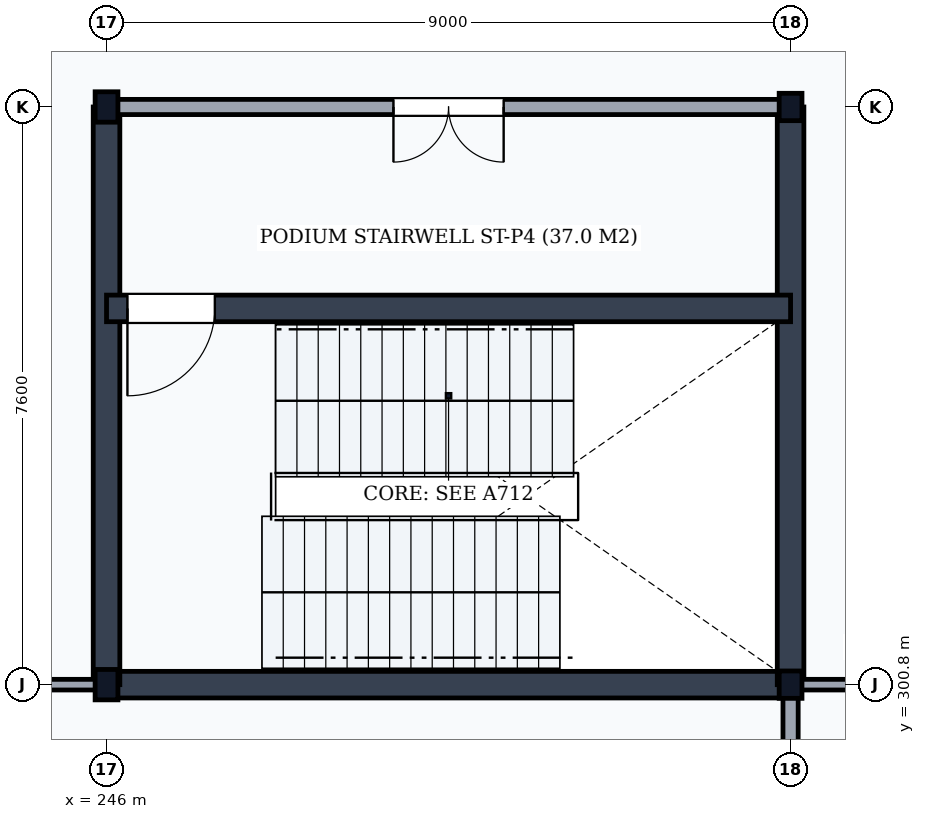
"""IFC4 building model, lengths in metres.
Left out: names, types, materials, properties, quantities, classifications, styles, units other than length and angle.
Written with IfcOpenShell. Run it as: python <this file> out.ifc"""

import sys

from ifc_helpers import new_model, si_unit, direction, frame, frame_2d, origin, origin_2d, place, context, subcontext, project, spatial, rectangle, i_section, extrude, element, fill, save


model = new_model("IFC4")
c1 = context("Model", 3, precision=1e-05, world=origin(), true_north=direction((0.0, 1.0)))
c2 = subcontext(c1, "Body", "Model", "MODEL_VIEW")
j1 = project(units=[si_unit("LENGTHUNIT", "METRE"), si_unit("PLANEANGLEUNIT", "RADIAN")], contexts=[c1])
p1 = place(None, origin())
s1 = spatial("IfcSite", under=j1, at=p1, CompositionType="ELEMENT")
p2 = place(p1, origin())
s2 = spatial("IfcBuilding", under=s1, at=p2, CompositionType="ELEMENT")
p3 = place(p2, frame((0.0, 0.0, 10.5)))
s3 = spatial("IfcBuildingStorey", under=s2, at=p3, CompositionType="ELEMENT", Elevation=10.5)
for number, where, z_axis, x_axis in (
    (1, (246.0, 300.8, 0.0), (0.0, 0.0, 1.0), (1.0, 0.0, 0.0)),
    (2, (246.0, 308.4, 0.0), (0.0, 0.0, 1.0), (1.0, 0.0, 0.0)),
):
    element("IfcColumn", number, at=place(p3, frame(where, z_axis=z_axis, x_axis=x_axis)), inside=s3, PredefinedType="COLUMN", context=c2, shape_type="SweptSolid", body=[
        extrude(i_section(OverallWidth=0.3, OverallDepth=0.4, WebThickness=0.013, FlangeThickness=0.024, FilletRadius=0.027, at=origin_2d()), origin(), (0.0, 0.0, 1.0), 5.1),
    ])
for number, where, z_axis, x_axis in (
    (3, (255.0, 300.8, 0.0), (0.0, 0.0, 1.0), (1.0, 0.0, 0.0)),
    (4, (255.0, 308.4, 0.0), (0.0, 0.0, 1.0), (1.0, 0.0, 0.0)),
):
    element("IfcColumn", number, at=place(p3, frame(where, z_axis=z_axis, x_axis=x_axis)), inside=s3, PredefinedType="COLUMN", context=c2, shape_type="SweptSolid", body=[
        extrude(i_section(OverallWidth=0.3, OverallDepth=0.36, WebThickness=0.012, FlangeThickness=0.022, FilletRadius=0.027, at=origin_2d()), origin(), (0.0, 0.0, 1.0), 5.1),
    ])
p4 = place(p3, frame((246.0, 300.8, 0.0), z_axis=(0.0, 0.0, 1.0), x_axis=(1.0, 0.0, 0.0)))
e5 = element("IfcWall", 5, at=p4, inside=s3, PredefinedType="SHEAR", context=c2, shape_type="SweptSolid", body=[
    extrude(rectangle(XDim=9.0, YDim=0.35, at=frame_2d((4.5, 0.0))), origin(), (0.0, 0.0, 1.0), 4.84),
])
for number, where, z_axis, x_axis in (
    (6, (246.0, 300.8, 0.0), (0.0, 0.0, 1.0), (0.0, 1.0, 0.0)),
    (7, (255.0, 300.8, 0.0), (0.0, 0.0, 1.0), (0.0, 1.0, 0.0)),
):
    element("IfcWall", number, at=place(p3, frame(where, z_axis=z_axis, x_axis=x_axis)), inside=s3, PredefinedType="SHEAR", context=c2, shape_type="SweptSolid", body=[
        extrude(rectangle(XDim=7.6, YDim=0.35, at=frame_2d((3.8, 0.0))), origin(), (0.0, 0.0, 1.0), 4.84),
    ])
p5 = place(p3, frame((246.0, 305.75, 0.0), z_axis=(0.0, 0.0, 1.0), x_axis=(1.0, 0.0, 0.0)))
e8 = element("IfcWall", 8, at=p5, inside=s3, PredefinedType="SHEAR", context=c2, shape_type="SweptSolid", body=[
    extrude(rectangle(XDim=9.0, YDim=0.35, at=frame_2d((4.5, 0.0))), origin(), (0.0, 0.0, 1.0), 4.84),
])
p6 = place(p5, frame((0.275, 0.0, 0.0)))
e9 = element("IfcOpeningElement", 9, at=p6, cuts=e8, PredefinedType="OPENING", context=c2, shape_type="SweptSolid", body=[
    extrude(rectangle(XDim=1.15, YDim=2.15, at=frame_2d((0.575, 1.075))), frame((0.0, 0.19, 0.0), z_axis=(0.0, -1.0, 0.0), x_axis=(1.0, 0.0, 0.0)), (0.0, 0.0, 1.0), 0.38),
])
p7 = place(p3, frame((246.0, 308.4, 0.0), z_axis=(0.0, 0.0, 1.0), x_axis=(1.0, 0.0, 0.0)))
e10 = element("IfcWall", 10, at=p7, inside=s3, PredefinedType="PARTITIONING", context=c2, shape_type="SweptSolid", body=[
    extrude(rectangle(XDim=9.0, YDim=0.2, at=frame_2d((4.5, 0.0))), origin(), (0.0, 0.0, 1.0), 4.288),
])
p8 = place(p7, frame((3.775, 0.0, 0.0)))
e11 = element("IfcOpeningElement", 11, at=p8, cuts=e10, PredefinedType="OPENING", context=c2, shape_type="SweptSolid", body=[
    extrude(rectangle(XDim=1.45, YDim=2.2, at=frame_2d((0.725, 1.1))), frame((0.0, 0.115, 0.0), z_axis=(0.0, -1.0, 0.0), x_axis=(1.0, 0.0, 0.0)), (0.0, 0.0, 1.0), 0.23),
])
p9 = place(p3, frame((255.0, 258.2, 0.0), z_axis=(0.0, 0.0, 1.0), x_axis=(0.0, 1.0, 0.0)))
e12 = element("IfcWall", 12, at=p9, inside=s3, PredefinedType="PARTITIONING", context=c2, shape_type="SweptSolid", body=[
    extrude(rectangle(XDim=42.6, YDim=0.2, at=frame_2d((21.3, 0.0))), origin(), (0.0, 0.0, 1.0), 4.478),
])
p10 = place(p9, frame((5.2, 0.0, 0.0)))
e13 = element("IfcOpeningElement", 13, at=p10, cuts=e12, PredefinedType="OPENING", context=c2, shape_type="SweptSolid", body=[
    extrude(rectangle(XDim=1.6, YDim=2.25, at=frame_2d((0.8, 1.125))), frame((0.0, 0.115, 0.0), z_axis=(0.0, -1.0, 0.0), x_axis=(1.0, 0.0, 0.0)), (0.0, 0.0, 1.0), 0.23),
])
p11 = place(p3, frame((205.0, 300.8, 0.0), z_axis=(0.0, 0.0, 1.0), x_axis=(1.0, 0.0, 0.0)))
e14 = element("IfcWall", 14, at=p11, inside=s3, PredefinedType="PARTITIONING", context=c2, shape_type="SweptSolid", body=[
    extrude(rectangle(XDim=41.0, YDim=0.14, at=frame_2d((20.5, 0.0))), origin(), (0.0, 0.0, 1.0), 4.288),
])
p12 = place(p3, frame((255.0, 300.8, 0.0), z_axis=(0.0, 0.0, 1.0), x_axis=(1.0, 0.0, 0.0)))
e15 = element("IfcWall", 15, at=p12, inside=s3, PredefinedType="PARTITIONING", context=c2, shape_type="SweptSolid", body=[
    extrude(rectangle(XDim=3.0, YDim=0.14, at=frame_2d((1.5, 0.0))), origin(), (0.0, 0.0, 1.0), 4.288),
])
p13 = place(p12, frame((1.025, 0.0, 0.0)))
e16 = element("IfcOpeningElement", 16, at=p13, cuts=e15, PredefinedType="OPENING", context=c2, shape_type="SweptSolid", body=[
    extrude(rectangle(XDim=0.95, YDim=2.1, at=frame_2d((0.475, 1.05))), frame((0.0, 0.085, 0.0), z_axis=(0.0, -1.0, 0.0), x_axis=(1.0, 0.0, 0.0)), (0.0, 0.0, 1.0), 0.17),
])
p14 = place(p6, frame((1.15, 0.0, 0.0), z_axis=(0.0, 0.0, 1.0), x_axis=(-1.0, 0.0, 0.0)))
e17 = element("IfcDoor", 17, at=p14, inside=s3, OperationType="SINGLE_SWING_RIGHT", PredefinedType="DOOR", context=c2, shape_type="SweptSolid", body=[
    extrude(rectangle(XDim=1.15, YDim=2.15, at=frame_2d((0.575, 1.075))), frame((0.0, 0.025, 0.0), z_axis=(0.0, -1.0, 0.0), x_axis=(1.0, 0.0, 0.0)), (0.0, 0.0, 1.0), 0.05),
])
fill(e9, e17)
p15 = place(p8, frame((1.45, 0.0, 0.0), z_axis=(0.0, 0.0, 1.0), x_axis=(-1.0, 0.0, 0.0)))
e18 = element("IfcDoor", 18, at=p15, inside=s3, OperationType="DOUBLE_DOOR_SINGLE_SWING", PredefinedType="DOOR", context=c2, shape_type="SweptSolid", body=[
    extrude(rectangle(XDim=1.45, YDim=2.2, at=frame_2d((0.725, 1.1))), frame((0.0, 0.025, 0.0), z_axis=(0.0, -1.0, 0.0), x_axis=(1.0, 0.0, 0.0)), (0.0, 0.0, 1.0), 0.05),
])
fill(e11, e18)
save(model, sys.argv[1])
